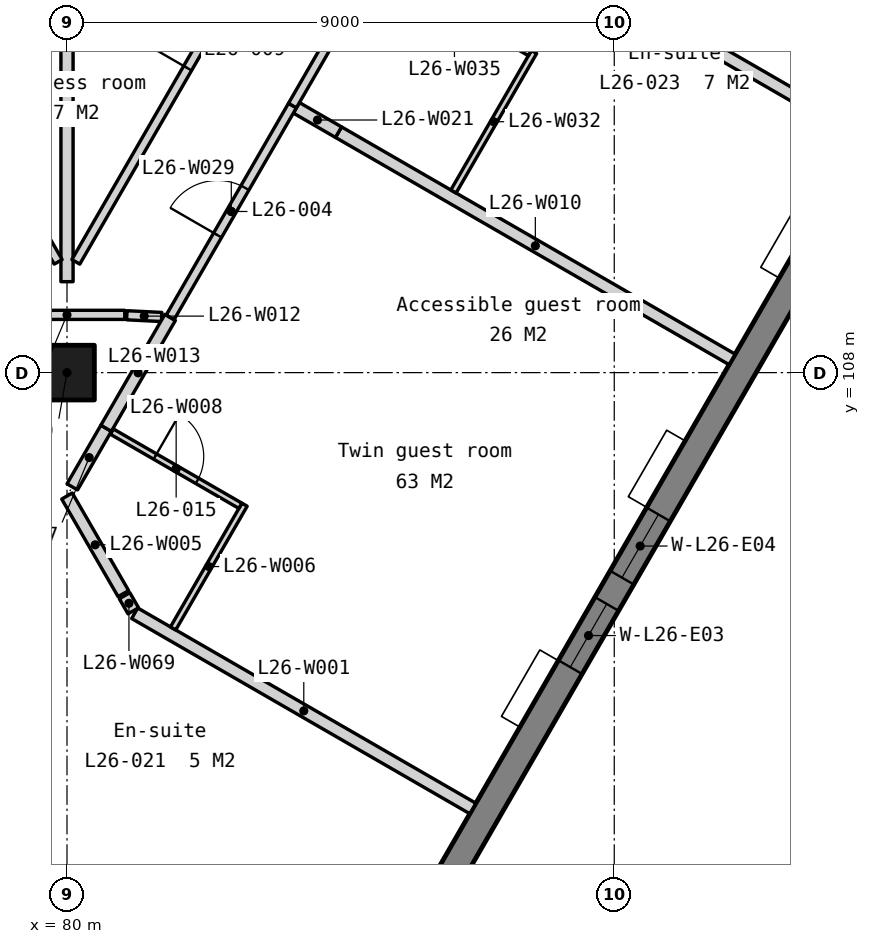
"""IFC4 building model, lengths in metres.
Left out: names, types, materials, properties, quantities, classifications, styles, units other than length and angle.
Written with IfcOpenShell. Run it as: python <this file> out.ifc"""

import sys

from ifc_helpers import new_model, si_unit, direction, frame, frame_2d, origin, origin_2d, place, context, subcontext, project, spatial, polyline, rectangle, outline, extrude, element, fill, save


model = new_model("IFC4")
c1 = context("Model", 3, precision=1e-05, world=origin(), true_north=direction((0.0, 1.0)))
c2 = subcontext(c1, "Body", "Model", "MODEL_VIEW")
j1 = project(units=[si_unit("LENGTHUNIT", "METRE"), si_unit("PLANEANGLEUNIT", "RADIAN")], contexts=[c1])
p1 = place(None, origin())
s1 = spatial("IfcSite", under=j1, at=p1, CompositionType="ELEMENT")
p2 = place(p1, origin())
s2 = spatial("IfcBuilding", under=s1, at=p2, CompositionType="ELEMENT")
p3 = place(p2, frame((0.0, 0.0, 106.3)))
s3 = spatial("IfcBuildingStorey", under=s2, at=p3, CompositionType="ELEMENT", Elevation=106.3)
p4 = place(p3, frame((80.0, 108.0, 0.0), z_axis=(0.0, 0.0, 1.0), x_axis=(1.0, 0.0, 0.0)))
e1 = element("IfcColumn", 1, at=p4, inside=s3, PredefinedType="COLUMN", context=c2, shape_type="SweptSolid", body=[
    extrude(rectangle(XDim=0.9, YDim=0.9, at=origin_2d()), origin(), (0.0, 0.0, 1.0), 3.5),
])
p5 = place(p3, frame((82.605, 93.333, -0.15), z_axis=(0.0, 0.0, 1.0), x_axis=(0.500000478905, 0.866025127289, 0.0)))
e2 = element("IfcWall", 2, at=p5, inside=s3, PredefinedType="SOLIDWALL", context=c2, shape_type="SweptSolid", body=[
    extrude(outline(polyline([(42.643, 0.0), (42.643, 3.5), (0.0, 3.5), (0.0, 0.0), (42.643, 0.0)])), frame((0.0, 0.225, 0.0), z_axis=(0.0, -1.0, 0.0), x_axis=(1.0, 0.0, 0.0)), (0.0, 0.0, 1.0), 0.45),
])
p6 = place(p5, frame((2.814, 0.0, 1.05)))
e3 = element("IfcOpeningElement", 3, at=p6, cuts=e2, PredefinedType="OPENING", context=c2, shape_type="SweptSolid", body=[
    extrude(rectangle(XDim=1.2, YDim=1.5, at=frame_2d((0.6, 0.75))), frame((0.0, 0.235, 0.0), z_axis=(0.0, -1.0, 0.0), x_axis=(1.0, 0.0, 0.0)), (0.0, 0.0, 1.0), 0.47),
])
p7 = place(p5, frame((4.514, 0.0, 1.05)))
e4 = element("IfcOpeningElement", 4, at=p7, cuts=e2, PredefinedType="OPENING", context=c2, shape_type="SweptSolid", body=[
    extrude(rectangle(XDim=1.2, YDim=1.5, at=frame_2d((0.6, 0.75))), frame((0.0, 0.235, 0.0), z_axis=(0.0, -1.0, 0.0), x_axis=(1.0, 0.0, 0.0)), (0.0, 0.0, 1.0), 0.47),
])
p8 = place(p5, frame((11.343, 0.0, 1.05)))
e5 = element("IfcOpeningElement", 5, at=p8, cuts=e2, PredefinedType="OPENING", context=c2, shape_type="SweptSolid", body=[
    extrude(rectangle(XDim=1.2, YDim=1.5, at=frame_2d((0.6, 0.75))), frame((0.0, 0.235, 0.0), z_axis=(0.0, -1.0, 0.0), x_axis=(1.0, 0.0, 0.0)), (0.0, 0.0, 1.0), 0.47),
])
p9 = place(p5, frame((13.043, 0.0, 1.05)))
e6 = element("IfcOpeningElement", 6, at=p9, cuts=e2, PredefinedType="OPENING", context=c2, shape_type="SweptSolid", body=[
    extrude(rectangle(XDim=1.2, YDim=1.5, at=frame_2d((0.6, 0.75))), frame((0.0, 0.235, 0.0), z_axis=(0.0, -1.0, 0.0), x_axis=(1.0, 0.0, 0.0)), (0.0, 0.0, 1.0), 0.47),
])
p10 = place(p5, frame((19.872, 0.0, 1.05)))
e7 = element("IfcOpeningElement", 7, at=p10, cuts=e2, PredefinedType="OPENING", context=c2, shape_type="SweptSolid", body=[
    extrude(rectangle(XDim=1.2, YDim=1.5, at=frame_2d((0.6, 0.75))), frame((0.0, 0.235, 0.0), z_axis=(0.0, -1.0, 0.0), x_axis=(1.0, 0.0, 0.0)), (0.0, 0.0, 1.0), 0.47),
])
p11 = place(p5, frame((21.572, 0.0, 1.05)))
e8 = element("IfcOpeningElement", 8, at=p11, cuts=e2, PredefinedType="OPENING", context=c2, shape_type="SweptSolid", body=[
    extrude(rectangle(XDim=1.2, YDim=1.5, at=frame_2d((0.6, 0.75))), frame((0.0, 0.235, 0.0), z_axis=(0.0, -1.0, 0.0), x_axis=(1.0, 0.0, 0.0)), (0.0, 0.0, 1.0), 0.47),
])
p12 = place(p5, frame((28.4, 0.0, 1.05)))
e9 = element("IfcOpeningElement", 9, at=p12, cuts=e2, PredefinedType="OPENING", context=c2, shape_type="SweptSolid", body=[
    extrude(rectangle(XDim=1.2, YDim=1.5, at=frame_2d((0.6, 0.75))), frame((0.0, 0.235, 0.0), z_axis=(0.0, -1.0, 0.0), x_axis=(1.0, 0.0, 0.0)), (0.0, 0.0, 1.0), 0.47),
])
p13 = place(p5, frame((30.1, 0.0, 1.05)))
e10 = element("IfcOpeningElement", 10, at=p13, cuts=e2, PredefinedType="OPENING", context=c2, shape_type="SweptSolid", body=[
    extrude(rectangle(XDim=1.2, YDim=1.5, at=frame_2d((0.6, 0.75))), frame((0.0, 0.235, 0.0), z_axis=(0.0, -1.0, 0.0), x_axis=(1.0, 0.0, 0.0)), (0.0, 0.0, 1.0), 0.47),
])
p14 = place(p5, frame((36.929, 0.0, 1.05)))
e11 = element("IfcOpeningElement", 11, at=p14, cuts=e2, PredefinedType="OPENING", context=c2, shape_type="SweptSolid", body=[
    extrude(rectangle(XDim=1.2, YDim=1.5, at=frame_2d((0.6, 0.75))), frame((0.0, 0.235, 0.0), z_axis=(0.0, -1.0, 0.0), x_axis=(1.0, 0.0, 0.0)), (0.0, 0.0, 1.0), 0.47),
])
p15 = place(p5, frame((38.629, 0.0, 1.05)))
e12 = element("IfcOpeningElement", 12, at=p15, cuts=e2, PredefinedType="OPENING", context=c2, shape_type="SweptSolid", body=[
    extrude(rectangle(XDim=1.2, YDim=1.5, at=frame_2d((0.6, 0.75))), frame((0.0, 0.235, 0.0), z_axis=(0.0, -1.0, 0.0), x_axis=(1.0, 0.0, 0.0)), (0.0, 0.0, 1.0), 0.47),
])
p16 = place(p3, frame((81.114, 104.042, 0.0), z_axis=(0.0, 0.0, 1.0), x_axis=(0.86602350115, -0.500003295444, 0.0)))
e13 = element("IfcWall", 13, at=p16, inside=s3, PredefinedType="PARTITIONING", context=c2, shape_type="SweptSolid", body=[
    extrude(rectangle(XDim=6.421, YDim=0.2, at=frame_2d((3.211, 0.0))), origin(), (0.0, 0.0, 1.0), 3.35),
])
p17 = place(p3, frame((80.0, 105.97, 0.0), z_axis=(0.0, 0.0, 1.0), x_axis=(0.499992292652, -0.866029853578, 0.0)))
e14 = element("IfcWall", 14, at=p17, inside=s3, PredefinedType="PARTITIONING", context=c2, shape_type="SweptSolid", body=[
    extrude(rectangle(XDim=1.854, YDim=0.2, at=frame_2d((0.927, 0.0))), origin(), (0.0, 0.0, 1.0), 3.35),
])
p18 = place(p3, frame((81.745, 103.793, 0.0), z_axis=(0.0, 0.0, 1.0), x_axis=(0.500016218704, 0.866016039709, 0.0)))
e15 = element("IfcWall", 15, at=p18, inside=s3, PredefinedType="PARTITIONING", context=c2, shape_type="SweptSolid", body=[
    extrude(rectangle(XDim=2.35, YDim=0.1, at=frame_2d((1.175, 0.0))), origin(), (0.0, 0.0, 1.0), 3.35),
])
p19 = place(p3, frame((80.087, 106.121, 0.0), z_axis=(0.0, 0.0, 1.0), x_axis=(0.500007201891, 0.866021245731, 0.0)))
e16 = element("IfcWall", 16, at=p19, inside=s3, PredefinedType="PARTITIONING", context=c2, shape_type="SweptSolid", body=[
    extrude(rectangle(XDim=1.113, YDim=0.2, at=frame_2d((0.557, 0.0))), origin(), (0.0, 0.0, 1.0), 3.35),
])
p20 = place(p3, frame((80.739, 107.03, 0.0), z_axis=(0.0, 0.0, 1.0), x_axis=(0.866023955769, -0.500002508028, 0.0)))
e17 = element("IfcWall", 17, at=p20, inside=s3, PredefinedType="PARTITIONING", context=c2, shape_type="SweptSolid", body=[
    extrude(rectangle(XDim=2.44, YDim=0.1, at=frame_2d((1.22, 0.0))), origin(), (0.0, 0.0, 1.0), 3.35),
])
p21 = place(p20, frame((0.82, 0.0, 0.0)))
e18 = element("IfcOpeningElement", 18, at=p21, cuts=e17, PredefinedType="OPENING", context=c2, shape_type="SweptSolid", body=[
    extrude(rectangle(XDim=0.8, YDim=2.1, at=frame_2d((0.4, 1.05))), frame((0.0, 0.06, 0.0), z_axis=(0.0, -1.0, 0.0), x_axis=(1.0, 0.0, 0.0)), (0.0, 0.0, 1.0), 0.12),
])
p22 = place(p3, frame((84.465, 111.955, 0.0), z_axis=(0.0, 0.0, 1.0), x_axis=(0.866025682925, -0.499999516514, 0.0)))
e19 = element("IfcWall", 19, at=p22, inside=s3, PredefinedType="PARTITIONING", context=c2, shape_type="SweptSolid", body=[
    extrude(rectangle(XDim=7.475, YDim=0.2, at=frame_2d((3.738, 0.0))), origin(), (0.0, 0.0, 1.0), 3.35),
])
p23 = place(p3, frame((80.983, 108.943, 0.0), z_axis=(0.0, 0.0, 1.0), x_axis=(0.998801719891, -0.048940007579, 0.0)))
e20 = element("IfcWall", 20, at=p23, inside=s3, PredefinedType="PARTITIONING", context=c2, shape_type="SweptSolid", body=[
    extrude(rectangle(XDim=0.574, YDim=0.15, at=frame_2d((0.287, 0.0))), origin(), (0.0, 0.0, 1.0), 3.35),
])
p24 = place(p3, frame((80.643, 107.085, 0.0), z_axis=(0.0, 0.0, 1.0), x_axis=(0.499929868688, 0.86606589033, 0.0)))
e21 = element("IfcWall", 21, at=p24, inside=s3, PredefinedType="PARTITIONING", context=c2, shape_type="SweptSolid", body=[
    extrude(rectangle(XDim=2.106, YDim=0.2, at=frame_2d((1.053, 0.0))), origin(), (0.0, 0.0, 1.0), 3.35),
])
p25 = place(p3, frame((79.05, 108.95, 0.0), z_axis=(0.0, 0.0, 1.0), x_axis=(1.0, 0.0, 0.0)))
e22 = element("IfcWall", 22, at=p25, inside=s3, PredefinedType="PARTITIONING", context=c2, shape_type="SweptSolid", body=[
    extrude(rectangle(XDim=1.9, YDim=0.15, at=frame_2d((0.95, 0.0))), origin(), (0.0, 0.0, 1.0), 3.35),
])
p26 = place(p3, frame((80.0, 109.496, 0.0), z_axis=(0.0, 0.0, 1.0), x_axis=(0.0, 1.0, 0.0)))
e23 = element("IfcWall", 23, at=p26, inside=s3, PredefinedType="PARTITIONING", context=c2, shape_type="SweptSolid", body=[
    extrude(rectangle(XDim=8.179, YDim=0.2, at=frame_2d((4.09, 0.0))), origin(), (0.0, 0.0, 1.0), 2.801),
])
p27 = place(p3, frame((83.772, 112.355, 0.0), z_axis=(0.0, 0.0, 1.0), x_axis=(0.866094119867, -0.499880961361, 0.0)))
e24 = element("IfcWall", 24, at=p27, inside=s3, PredefinedType="PARTITIONING", context=c2, shape_type="SweptSolid", body=[
    extrude(rectangle(XDim=0.8, YDim=0.2, at=frame_2d((0.4, 0.0))), origin(), (0.0, 0.0, 1.0), 3.35),
])
p28 = place(p3, frame((85.913, 116.043, 0.0), z_axis=(0.0, 0.0, 1.0), x_axis=(0.866022272496, -0.500005423512, 0.0)))
e25 = element("IfcWall", 25, at=p28, inside=s3, PredefinedType="PARTITIONING", context=c2, shape_type="SweptSolid", body=[
    extrude(rectangle(XDim=8.265, YDim=0.2, at=frame_2d((4.133, 0.0))), origin(), (0.0, 0.0, 1.0), 3.35),
])
p29 = place(p3, frame((81.696, 108.908, 0.0), z_axis=(0.0, 0.0, 1.0), x_axis=(0.500009633848, 0.866019841608, 0.0)))
e26 = element("IfcWall", 26, at=p29, inside=s3, PredefinedType="PARTITIONING", context=c2, shape_type="SweptSolid", body=[
    extrude(rectangle(XDim=4.023, YDim=0.15, at=frame_2d((2.011, 0.0))), origin(), (0.0, 0.0, 1.0), 3.35),
])
p30 = place(p29, frame((1.562, 0.0, 0.0)))
e27 = element("IfcOpeningElement", 27, at=p30, cuts=e26, PredefinedType="OPENING", context=c2, shape_type="SweptSolid", body=[
    extrude(rectangle(XDim=0.9, YDim=2.1, at=frame_2d((0.45, 1.05))), frame((0.0, 0.085, 0.0), z_axis=(0.0, -1.0, 0.0), x_axis=(1.0, 0.0, 0.0)), (0.0, 0.0, 1.0), 0.17),
])
p31 = place(p3, frame((86.356, 110.979, 0.0), z_axis=(0.0, 0.0, 1.0), x_axis=(0.499953715521, 0.866052124492, 0.0)))
e28 = element("IfcWall", 28, at=p31, inside=s3, PredefinedType="PARTITIONING", context=c2, shape_type="SweptSolid", body=[
    extrude(rectangle(XDim=2.65, YDim=0.1, at=frame_2d((1.325, 0.0))), origin(), (0.0, 0.0, 1.0), 3.35),
])
p32 = place(p3, frame((85.131, 114.688, 0.0), z_axis=(0.0, 0.0, 1.0), x_axis=(0.866047940603, -0.499960963054, 0.0)))
e29 = element("IfcWall", 29, at=p32, inside=s3, PredefinedType="PARTITIONING", context=c2, shape_type="SweptSolid", body=[
    extrude(rectangle(XDim=2.865, YDim=0.1, at=frame_2d((1.433, 0.0))), origin(), (0.0, 0.0, 1.0), 3.35),
])
p33 = place(p32, frame((1.032, 0.0, 0.0)))
e30 = element("IfcOpeningElement", 30, at=p33, cuts=e29, PredefinedType="OPENING", context=c2, shape_type="SweptSolid", body=[
    extrude(rectangle(XDim=0.8, YDim=2.1, at=frame_2d((0.4, 1.05))), frame((0.0, 0.06, 0.0), z_axis=(0.0, -1.0, 0.0), x_axis=(1.0, 0.0, 0.0)), (0.0, 0.0, 1.0), 0.12),
])
p34 = place(p3, frame((83.708, 112.392, 0.0), z_axis=(0.0, 0.0, 1.0), x_axis=(0.500042931351, 0.866000615939, 0.0)))
e31 = element("IfcWall", 31, at=p34, inside=s3, PredefinedType="PARTITIONING", context=c2, shape_type="SweptSolid", body=[
    extrude(rectangle(XDim=4.264, YDim=0.15, at=frame_2d((2.132, 0.0))), origin(), (0.0, 0.0, 1.0), 3.35),
])
p35 = place(p34, frame((2.964, 0.0, 0.0)))
e32 = element("IfcOpeningElement", 32, at=p35, cuts=e31, PredefinedType="OPENING", context=c2, shape_type="SweptSolid", body=[
    extrude(rectangle(XDim=1.0, YDim=2.1, at=frame_2d((0.5, 1.05))), frame((0.0, 0.085, 0.0), z_axis=(0.0, -1.0, 0.0), x_axis=(1.0, 0.0, 0.0)), (0.0, 0.0, 1.0), 0.17),
])
p36 = place(p3, frame((75.278, 117.75, 0.0), z_axis=(0.0, 0.0, 1.0), x_axis=(0.500002547313, -0.866023933087, 0.0)))
e33 = element("IfcWall", 33, at=p36, inside=s3, PredefinedType="PARTITIONING", context=c2, shape_type="SweptSolid", body=[
    extrude(rectangle(XDim=9.155, YDim=0.15, at=frame_2d((4.577, 0.0))), origin(), (0.0, 0.0, 1.0), 3.35),
])
p37 = place(p36, frame((3.677, 0.0, 0.0)))
e34 = element("IfcOpeningElement", 34, at=p37, cuts=e33, PredefinedType="OPENING", context=c2, shape_type="SweptSolid", body=[
    extrude(rectangle(XDim=1.8, YDim=2.1, at=frame_2d((0.9, 1.05))), frame((0.0, 0.085, 0.0), z_axis=(0.0, -1.0, 0.0), x_axis=(1.0, 0.0, 0.0)), (0.0, 0.0, 1.0), 0.17),
])
p38 = place(p3, frame((80.145, 109.822, 0.0), z_axis=(0.0, 0.0, 1.0), x_axis=(0.500002547313, 0.866023933087, 0.0)))
e35 = element("IfcWall", 35, at=p38, inside=s3, PredefinedType="PARTITIONING", context=c2, shape_type="SweptSolid", body=[
    extrude(rectangle(XDim=9.155, YDim=0.15, at=frame_2d((4.577, 0.0))), origin(), (0.0, 0.0, 1.0), 3.35),
])
p39 = place(p38, frame((3.677, 0.0, 0.0)))
e36 = element("IfcOpeningElement", 36, at=p39, cuts=e35, PredefinedType="OPENING", context=c2, shape_type="SweptSolid", body=[
    extrude(rectangle(XDim=1.8, YDim=2.1, at=frame_2d((0.9, 1.05))), frame((0.0, 0.085, 0.0), z_axis=(0.0, -1.0, 0.0), x_axis=(1.0, 0.0, 0.0)), (0.0, 0.0, 1.0), 0.17),
])
p40 = place(p3, frame((80.947, 104.331, 0.0), z_axis=(0.0, 0.0, 1.0), x_axis=(0.500164219654, -0.865930570761, 0.0)))
e37 = element("IfcWall", 37, at=p40, inside=s3, PredefinedType="PARTITIONING", context=c2, shape_type="SweptSolid", body=[
    extrude(rectangle(XDim=0.287, YDim=0.2, at=frame_2d((0.144, 0.0))), origin(), (0.0, 0.0, 1.0), 3.35),
])
p41 = place(p8, origin())
e38 = element("IfcWindow", 38, at=p41, inside=s3, PartitioningType="SINGLE_PANEL", PredefinedType="WINDOW", context=c2, shape_type="SweptSolid", body=[
    extrude(rectangle(XDim=1.2, YDim=1.5, at=frame_2d((0.6, 0.75))), frame((0.0, 0.03, 0.0), z_axis=(0.0, -1.0, 0.0), x_axis=(1.0, 0.0, 0.0)), (0.0, 0.0, 1.0), 0.06),
])
fill(e5, e38)
p42 = place(p9, origin())
e39 = element("IfcWindow", 39, at=p42, inside=s3, PartitioningType="SINGLE_PANEL", PredefinedType="WINDOW", context=c2, shape_type="SweptSolid", body=[
    extrude(rectangle(XDim=1.2, YDim=1.5, at=frame_2d((0.6, 0.75))), frame((0.0, 0.03, 0.0), z_axis=(0.0, -1.0, 0.0), x_axis=(1.0, 0.0, 0.0)), (0.0, 0.0, 1.0), 0.06),
])
fill(e6, e39)
p43 = place(p30, origin())
e40 = element("IfcDoor", 40, at=p43, inside=s3, OperationType="SINGLE_SWING_LEFT", PredefinedType="DOOR", context=c2, shape_type="SweptSolid", body=[
    extrude(rectangle(XDim=0.9, YDim=2.1, at=frame_2d((0.45, 1.05))), frame((0.0, 0.025, 0.0), z_axis=(0.0, -1.0, 0.0), x_axis=(1.0, 0.0, 0.0)), (0.0, 0.0, 1.0), 0.05),
])
fill(e27, e40)
p44 = place(p39, origin())
e41 = element("IfcDoor", 41, at=p44, inside=s3, OperationType="SINGLE_SWING_LEFT", PredefinedType="DOOR", context=c2, shape_type="SweptSolid", body=[
    extrude(rectangle(XDim=1.8, YDim=2.1, at=frame_2d((0.9, 1.05))), frame((0.0, 0.025, 0.0), z_axis=(0.0, -1.0, 0.0), x_axis=(1.0, 0.0, 0.0)), (0.0, 0.0, 1.0), 0.05),
])
fill(e36, e41)
p45 = place(p21, origin())
e42 = element("IfcDoor", 42, at=p45, inside=s3, OperationType="SINGLE_SWING_LEFT", PredefinedType="DOOR", context=c2, shape_type="SweptSolid", body=[
    extrude(rectangle(XDim=0.8, YDim=2.1, at=frame_2d((0.4, 1.05))), frame((0.0, 0.025, 0.0), z_axis=(0.0, -1.0, 0.0), x_axis=(1.0, 0.0, 0.0)), (0.0, 0.0, 1.0), 0.05),
])
fill(e18, e42)
save(model, sys.argv[1])
